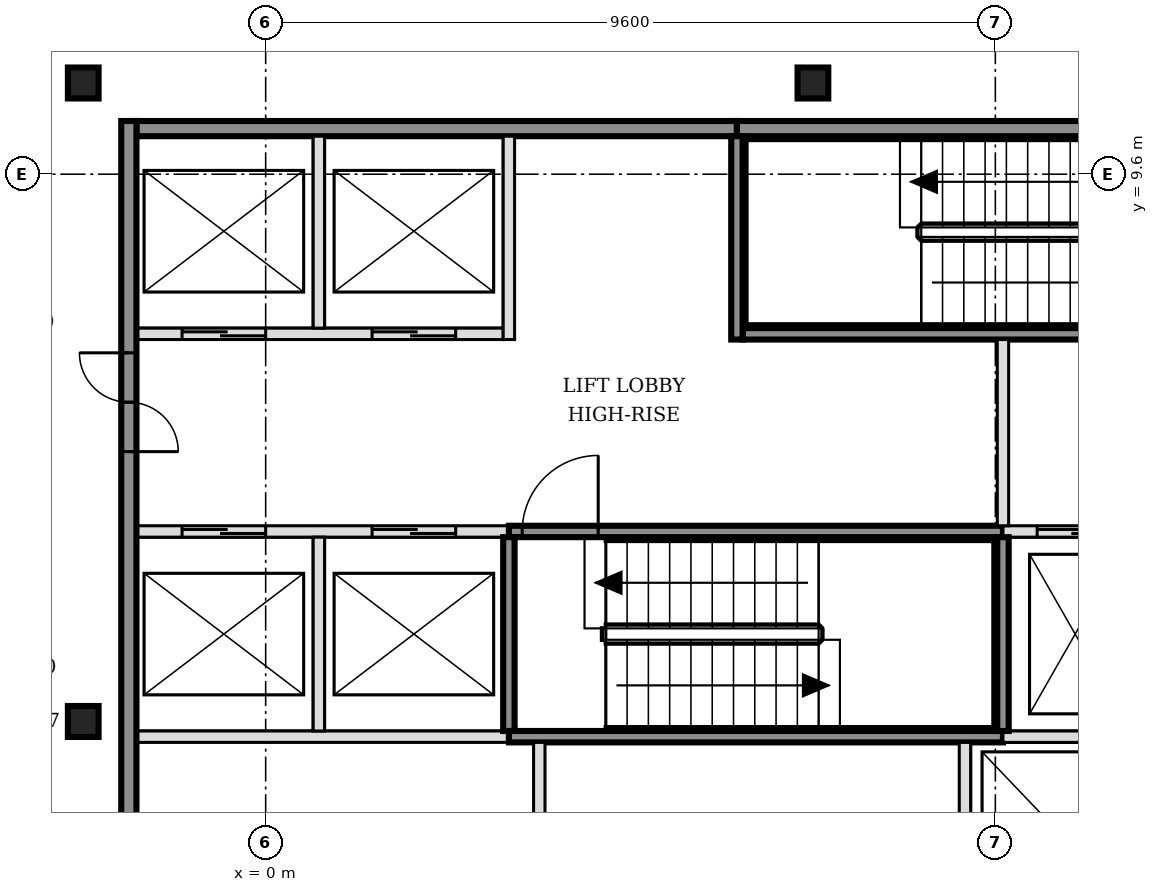
"""IFC4 building model, lengths in metres.
Left out: names, types, materials, properties, quantities, classifications, styles, units other than length and angle.
Written with IfcOpenShell. Run it as: python <this file> out.ifc"""

import sys

from ifc_helpers import new_model, si_unit, direction, frame, frame_2d, origin, origin_2d, place, context, subcontext, project, spatial, rectangle, i_section, extrude, element, fill, save


model = new_model("IFC4")
c1 = context("Model", 3, precision=1e-05, world=origin(), true_north=direction((0.0, 1.0)))
c2 = subcontext(c1, "Body", "Model", "MODEL_VIEW")
j1 = project(units=[si_unit("LENGTHUNIT", "METRE"), si_unit("PLANEANGLEUNIT", "RADIAN")], contexts=[c1])
p1 = place(None, origin())
s1 = spatial("IfcSite", under=j1, at=p1, CompositionType="ELEMENT")
p2 = place(p1, origin())
s2 = spatial("IfcBuilding", under=s1, at=p2, CompositionType="ELEMENT")
p3 = place(p2, frame((0.0, 0.0, 210.6)))
s3 = spatial("IfcBuildingStorey", under=s2, at=p3, CompositionType="ELEMENT", Elevation=210.6)
for number, where, z_axis, x_axis in (
    (1, (-2.4, 2.4, -0.15), (0.0, 0.0, 1.0), (1.0, 0.0, 0.0)),
    (2, (-2.4, 10.8, -0.15), (0.0, 0.0, 1.0), (1.0, 0.0, 0.0)),
    (3, (7.2, 10.8, -0.15), (0.0, 0.0, 1.0), (1.0, 0.0, 0.0)),
):
    element("IfcColumn", number, at=place(p3, frame(where, z_axis=z_axis, x_axis=x_axis)), inside=s3, PredefinedType="COLUMN", context=c2, shape_type="SweptSolid", body=[
        extrude(i_section(OverallWidth=0.404, OverallDepth=0.407, WebThickness=0.027, FlangeThickness=0.044, FilletRadius=0.015, at=origin_2d()), origin(), (0.0, 0.0, 1.0), 3.6),
    ])
p4 = place(p3, frame((-1.7, 2.2, 0.0), z_axis=(0.0, 0.0, 1.0), x_axis=(1.0, 0.0, 0.0)))
e4 = element("IfcWall", 4, at=p4, inside=s3, PredefinedType="SOLIDWALL", context=c2, shape_type="SweptSolid", body=[
    extrude(rectangle(XDim=4.9, YDim=0.15, at=frame_2d((2.45, 0.0))), origin(), (0.0, 0.0, 1.0), 3.45),
])
p5 = place(p3, frame((3.2, 2.2, 0.0), z_axis=(0.0, 0.0, 1.0), x_axis=(1.0, 0.0, 0.0)))
e5 = element("IfcWall", 5, at=p5, inside=s3, PredefinedType="SOLIDWALL", context=c2, shape_type="SweptSolid", body=[
    extrude(rectangle(XDim=6.5, YDim=0.15, at=frame_2d((3.25, 0.0))), origin(), (0.0, 0.0, 1.0), 3.45),
])
p6 = place(p3, frame((9.7, 2.2, 0.0), z_axis=(0.0, 0.0, 1.0), x_axis=(1.0, 0.0, 0.0)))
e6 = element("IfcWall", 6, at=p6, inside=s3, PredefinedType="SOLIDWALL", context=c2, shape_type="SweptSolid", body=[
    extrude(rectangle(XDim=4.525, YDim=0.15, at=frame_2d((2.263, 0.0))), origin(), (0.0, 0.0, 1.0), 3.45),
])
p7 = place(p3, frame((-1.7, 4.9, 0.0), z_axis=(0.0, 0.0, 1.0), x_axis=(1.0, 0.0, 0.0)))
e7 = element("IfcWall", 7, at=p7, inside=s3, PredefinedType="SOLIDWALL", context=c2, shape_type="SweptSolid", body=[
    extrude(rectangle(XDim=4.9, YDim=0.15, at=frame_2d((2.45, 0.0))), origin(), (0.0, 0.0, 1.0), 3.45),
])
p8 = place(p7, frame((0.6, 0.0, 0.0)))
e8 = element("IfcOpeningElement", 8, at=p8, cuts=e7, PredefinedType="OPENING", context=c2, shape_type="SweptSolid", body=[
    extrude(rectangle(XDim=1.1, YDim=2.1, at=frame_2d((0.55, 1.05))), frame((0.0, 0.085, 0.0), z_axis=(0.0, -1.0, 0.0), x_axis=(1.0, 0.0, 0.0)), (0.0, 0.0, 1.0), 0.17),
])
p9 = place(p7, frame((3.1, 0.0, 0.0)))
e9 = element("IfcOpeningElement", 9, at=p9, cuts=e7, PredefinedType="OPENING", context=c2, shape_type="SweptSolid", body=[
    extrude(rectangle(XDim=1.1, YDim=2.1, at=frame_2d((0.55, 1.05))), frame((0.0, 0.085, 0.0), z_axis=(0.0, -1.0, 0.0), x_axis=(1.0, 0.0, 0.0)), (0.0, 0.0, 1.0), 0.17),
])
p10 = place(p3, frame((3.2, 4.9, 0.0), z_axis=(0.0, 0.0, 1.0), x_axis=(1.0, 0.0, 0.0)))
e10 = element("IfcWall", 10, at=p10, inside=s3, PredefinedType="SOLIDWALL", context=c2, shape_type="SweptSolid", body=[
    extrude(rectangle(XDim=6.5, YDim=0.15, at=frame_2d((3.25, 0.0))), origin(), (0.0, 0.0, 1.0), 3.45),
])
p11 = place(p10, frame((0.175, 0.0, 0.0)))
e11 = element("IfcOpeningElement", 11, at=p11, cuts=e10, PredefinedType="OPENING", context=c2, shape_type="SweptSolid", body=[
    extrude(rectangle(XDim=1.0, YDim=2.1, at=frame_2d((0.5, 1.05))), frame((0.0, 0.085, 0.0), z_axis=(0.0, -1.0, 0.0), x_axis=(1.0, 0.0, 0.0)), (0.0, 0.0, 1.0), 0.17),
])
p12 = place(p3, frame((9.7, 4.9, 0.0), z_axis=(0.0, 0.0, 1.0), x_axis=(1.0, 0.0, 0.0)))
e12 = element("IfcWall", 12, at=p12, inside=s3, PredefinedType="SOLIDWALL", context=c2, shape_type="SweptSolid", body=[
    extrude(rectangle(XDim=6.4, YDim=0.15, at=frame_2d((3.2, 0.0))), origin(), (0.0, 0.0, 1.0), 3.45),
])
p13 = place(p12, frame((0.45, 0.0, 0.0)))
e13 = element("IfcOpeningElement", 13, at=p13, cuts=e12, PredefinedType="OPENING", context=c2, shape_type="SweptSolid", body=[
    extrude(rectangle(XDim=1.0, YDim=2.1, at=frame_2d((0.5, 1.05))), frame((0.0, 0.085, 0.0), z_axis=(0.0, -1.0, 0.0), x_axis=(1.0, 0.0, 0.0)), (0.0, 0.0, 1.0), 0.17),
])
p14 = place(p12, frame((2.35, 0.0, 0.0)))
e14 = element("IfcOpeningElement", 14, at=p14, cuts=e12, PredefinedType="OPENING", context=c2, shape_type="SweptSolid", body=[
    extrude(rectangle(XDim=1.0, YDim=2.1, at=frame_2d((0.5, 1.05))), frame((0.0, 0.085, 0.0), z_axis=(0.0, -1.0, 0.0), x_axis=(1.0, 0.0, 0.0)), (0.0, 0.0, 1.0), 0.17),
])
p15 = place(p12, frame((4.7, 0.0, 0.0)))
e15 = element("IfcOpeningElement", 15, at=p15, cuts=e12, PredefinedType="OPENING", context=c2, shape_type="SweptSolid", body=[
    extrude(rectangle(XDim=0.9, YDim=2.1, at=frame_2d((0.45, 1.05))), frame((0.0, 0.085, 0.0), z_axis=(0.0, -1.0, 0.0), x_axis=(1.0, 0.0, 0.0)), (0.0, 0.0, 1.0), 0.17),
])
p16 = place(p3, frame((-1.7, 7.5, 0.0), z_axis=(0.0, 0.0, 1.0), x_axis=(1.0, 0.0, 0.0)))
e16 = element("IfcWall", 16, at=p16, inside=s3, PredefinedType="SOLIDWALL", context=c2, shape_type="SweptSolid", body=[
    extrude(rectangle(XDim=4.825, YDim=0.15, at=frame_2d((2.413, 0.0))), origin(), (0.0, 0.0, 1.0), 3.45),
])
p17 = place(p16, frame((0.6, 0.0, 0.0)))
e17 = element("IfcOpeningElement", 17, at=p17, cuts=e16, PredefinedType="OPENING", context=c2, shape_type="SweptSolid", body=[
    extrude(rectangle(XDim=1.1, YDim=2.1, at=frame_2d((0.55, 1.05))), frame((0.0, 0.085, 0.0), z_axis=(0.0, -1.0, 0.0), x_axis=(1.0, 0.0, 0.0)), (0.0, 0.0, 1.0), 0.17),
])
p18 = place(p16, frame((3.1, 0.0, 0.0)))
e18 = element("IfcOpeningElement", 18, at=p18, cuts=e16, PredefinedType="OPENING", context=c2, shape_type="SweptSolid", body=[
    extrude(rectangle(XDim=1.1, YDim=2.1, at=frame_2d((0.55, 1.05))), frame((0.0, 0.085, 0.0), z_axis=(0.0, -1.0, 0.0), x_axis=(1.0, 0.0, 0.0)), (0.0, 0.0, 1.0), 0.17),
])
p19 = place(p3, frame((6.275, 7.5, 0.0), z_axis=(0.0, 0.0, 1.0), x_axis=(1.0, 0.0, 0.0)))
e19 = element("IfcWall", 19, at=p19, inside=s3, PredefinedType="SOLIDWALL", context=c2, shape_type="SweptSolid", body=[
    extrude(rectangle(XDim=6.425, YDim=0.15, at=frame_2d((3.212, 0.0))), origin(), (0.0, 0.0, 1.0), 3.45),
])
p20 = place(p19, frame((5.225, 0.0, 0.0)))
e20 = element("IfcOpeningElement", 20, at=p20, cuts=e19, PredefinedType="OPENING", context=c2, shape_type="SweptSolid", body=[
    extrude(rectangle(XDim=1.0, YDim=2.1, at=frame_2d((0.5, 1.05))), frame((0.0, 0.085, 0.0), z_axis=(0.0, -1.0, 0.0), x_axis=(1.0, 0.0, 0.0)), (0.0, 0.0, 1.0), 0.17),
])
p21 = place(p3, frame((-1.7, 10.2, 0.0), z_axis=(0.0, 0.0, 1.0), x_axis=(1.0, 0.0, 0.0)))
e21 = element("IfcWall", 21, at=p21, inside=s3, PredefinedType="SOLIDWALL", context=c2, shape_type="SweptSolid", body=[
    extrude(rectangle(XDim=7.9, YDim=0.2, at=frame_2d((3.95, 0.0))), origin(), (0.0, 0.0, 1.0), 3.45),
])
p22 = place(p3, frame((6.2, 10.2, 0.0), z_axis=(0.0, 0.0, 1.0), x_axis=(1.0, 0.0, 0.0)))
e22 = element("IfcWall", 22, at=p22, inside=s3, PredefinedType="SOLIDWALL", context=c2, shape_type="SweptSolid", body=[
    extrude(rectangle(XDim=6.5, YDim=0.2, at=frame_2d((3.25, 0.0))), origin(), (0.0, 0.0, 1.0), 3.45),
])
p23 = place(p3, frame((-1.8, -5.5, 0.0), z_axis=(0.0, 0.0, 1.0), x_axis=(0.0, 1.0, 0.0)))
e23 = element("IfcWall", 23, at=p23, inside=s3, PredefinedType="SOLIDWALL", context=c2, shape_type="SweptSolid", body=[
    extrude(rectangle(XDim=15.8, YDim=0.2, at=frame_2d((7.9, 0.0))), origin(), (0.0, 0.0, 1.0), 3.45),
])
p24 = place(p23, frame((3.05, 0.0, 0.0)))
e24 = element("IfcOpeningElement", 24, at=p24, cuts=e23, PredefinedType="OPENING", context=c2, shape_type="SweptSolid", body=[
    extrude(rectangle(XDim=1.3, YDim=2.1, at=frame_2d((0.65, 1.05))), frame((0.0, 0.11, 0.0), z_axis=(0.0, -1.0, 0.0), x_axis=(1.0, 0.0, 0.0)), (0.0, 0.0, 1.0), 0.22),
])
p25 = place(p23, frame((11.45, 0.0, 0.0)))
e25 = element("IfcOpeningElement", 25, at=p25, cuts=e23, PredefinedType="OPENING", context=c2, shape_type="SweptSolid", body=[
    extrude(rectangle(XDim=1.3, YDim=2.1, at=frame_2d((0.65, 1.05))), frame((0.0, 0.11, 0.0), z_axis=(0.0, -1.0, 0.0), x_axis=(1.0, 0.0, 0.0)), (0.0, 0.0, 1.0), 0.22),
])
p26 = place(p3, frame((0.7, 2.275, 0.0), z_axis=(0.0, 0.0, 1.0), x_axis=(0.0, 1.0, 0.0)))
e26 = element("IfcWall", 26, at=p26, inside=s3, PredefinedType="SOLIDWALL", context=c2, shape_type="SweptSolid", body=[
    extrude(rectangle(XDim=2.55, YDim=0.15, at=frame_2d((1.275, 0.0))), origin(), (0.0, 0.0, 1.0), 3.45),
])
p27 = place(p3, frame((0.7, 7.575, 0.0), z_axis=(0.0, 0.0, 1.0), x_axis=(0.0, 1.0, 0.0)))
e27 = element("IfcWall", 27, at=p27, inside=s3, PredefinedType="SOLIDWALL", context=c2, shape_type="SweptSolid", body=[
    extrude(rectangle(XDim=2.525, YDim=0.15, at=frame_2d((1.263, 0.0))), origin(), (0.0, 0.0, 1.0), 3.45),
])
p28 = place(p3, frame((3.2, 2.275, 0.0), z_axis=(0.0, 0.0, 1.0), x_axis=(0.0, 1.0, 0.0)))
e28 = element("IfcWall", 28, at=p28, inside=s3, PredefinedType="SOLIDWALL", context=c2, shape_type="SweptSolid", body=[
    extrude(rectangle(XDim=2.55, YDim=0.15, at=frame_2d((1.275, 0.0))), origin(), (0.0, 0.0, 1.0), 3.45),
])
p29 = place(p3, frame((3.2, 7.425, 0.0), z_axis=(0.0, 0.0, 1.0), x_axis=(0.0, 1.0, 0.0)))
e29 = element("IfcWall", 29, at=p29, inside=s3, PredefinedType="SOLIDWALL", context=c2, shape_type="SweptSolid", body=[
    extrude(rectangle(XDim=2.675, YDim=0.15, at=frame_2d((1.337, 0.0))), origin(), (0.0, 0.0, 1.0), 3.45),
])
p30 = place(p3, frame((3.6, -0.325, 0.0), z_axis=(0.0, 0.0, 1.0), x_axis=(0.0, 1.0, 0.0)))
e30 = element("IfcWall", 30, at=p30, inside=s3, PredefinedType="PARTITIONING", context=c2, shape_type="SweptSolid", body=[
    extrude(rectangle(XDim=2.45, YDim=0.15, at=frame_2d((1.225, 0.0))), origin(), (0.0, 0.0, 1.0), 3.45),
])
p31 = place(p3, frame((6.2, 7.425, 0.0), z_axis=(0.0, 0.0, 1.0), x_axis=(0.0, 1.0, 0.0)))
e31 = element("IfcWall", 31, at=p31, inside=s3, PredefinedType="SOLIDWALL", context=c2, shape_type="SweptSolid", body=[
    extrude(rectangle(XDim=2.675, YDim=0.15, at=frame_2d((1.337, 0.0))), origin(), (0.0, 0.0, 1.0), 3.45),
])
p32 = place(p3, frame((9.2, -0.475, 0.0), z_axis=(0.0, 0.0, 1.0), x_axis=(0.0, 1.0, 0.0)))
e32 = element("IfcWall", 32, at=p32, inside=s3, PredefinedType="SOLIDWALL", context=c2, shape_type="SweptSolid", body=[
    extrude(rectangle(XDim=2.6, YDim=0.15, at=frame_2d((1.3, 0.0))), origin(), (0.0, 0.0, 1.0), 3.45),
])
p33 = place(p3, frame((9.7, 2.275, 0.0), z_axis=(0.0, 0.0, 1.0), x_axis=(0.0, 1.0, 0.0)))
e33 = element("IfcWall", 33, at=p33, inside=s3, PredefinedType="SOLIDWALL", context=c2, shape_type="SweptSolid", body=[
    extrude(rectangle(XDim=2.55, YDim=0.15, at=frame_2d((1.275, 0.0))), origin(), (0.0, 0.0, 1.0), 3.45),
])
p34 = place(p3, frame((9.7, 4.975, 0.0), z_axis=(0.0, 0.0, 1.0), x_axis=(0.0, 1.0, 0.0)))
e34 = element("IfcWall", 34, at=p34, inside=s3, PredefinedType="SOLIDWALL", context=c2, shape_type="SweptSolid", body=[
    extrude(rectangle(XDim=2.45, YDim=0.15, at=frame_2d((1.225, 0.0))), origin(), (0.0, 0.0, 1.0), 3.45),
])
p35 = place(p8, origin())
e35 = element("IfcDoor", 35, at=p35, inside=s3, OperationType="DOUBLE_DOOR_SLIDING", PredefinedType="DOOR", context=c2, shape_type="SweptSolid", body=[
    extrude(rectangle(XDim=1.1, YDim=2.1, at=frame_2d((0.55, 1.05))), frame((0.0, 0.025, 0.0), z_axis=(0.0, -1.0, 0.0), x_axis=(1.0, 0.0, 0.0)), (0.0, 0.0, 1.0), 0.05),
])
fill(e8, e35)
p36 = place(p9, origin())
e36 = element("IfcDoor", 36, at=p36, inside=s3, OperationType="DOUBLE_DOOR_SLIDING", PredefinedType="DOOR", context=c2, shape_type="SweptSolid", body=[
    extrude(rectangle(XDim=1.1, YDim=2.1, at=frame_2d((0.55, 1.05))), frame((0.0, 0.025, 0.0), z_axis=(0.0, -1.0, 0.0), x_axis=(1.0, 0.0, 0.0)), (0.0, 0.0, 1.0), 0.05),
])
fill(e9, e36)
p37 = place(p17, origin())
e37 = element("IfcDoor", 37, at=p37, inside=s3, OperationType="DOUBLE_DOOR_SLIDING", PredefinedType="DOOR", context=c2, shape_type="SweptSolid", body=[
    extrude(rectangle(XDim=1.1, YDim=2.1, at=frame_2d((0.55, 1.05))), frame((0.0, 0.025, 0.0), z_axis=(0.0, -1.0, 0.0), x_axis=(1.0, 0.0, 0.0)), (0.0, 0.0, 1.0), 0.05),
])
fill(e17, e37)
p38 = place(p18, origin())
e38 = element("IfcDoor", 38, at=p38, inside=s3, OperationType="DOUBLE_DOOR_SLIDING", PredefinedType="DOOR", context=c2, shape_type="SweptSolid", body=[
    extrude(rectangle(XDim=1.1, YDim=2.1, at=frame_2d((0.55, 1.05))), frame((0.0, 0.025, 0.0), z_axis=(0.0, -1.0, 0.0), x_axis=(1.0, 0.0, 0.0)), (0.0, 0.0, 1.0), 0.05),
])
fill(e18, e38)
p39 = place(p13, origin())
e39 = element("IfcDoor", 39, at=p39, inside=s3, OperationType="DOUBLE_DOOR_SLIDING", PredefinedType="DOOR", context=c2, shape_type="SweptSolid", body=[
    extrude(rectangle(XDim=1.0, YDim=2.1, at=frame_2d((0.5, 1.05))), frame((0.0, 0.025, 0.0), z_axis=(0.0, -1.0, 0.0), x_axis=(1.0, 0.0, 0.0)), (0.0, 0.0, 1.0), 0.05),
])
fill(e13, e39)
p40 = place(p11, origin())
e40 = element("IfcDoor", 40, at=p40, inside=s3, OperationType="SINGLE_SWING_RIGHT", PredefinedType="DOOR", context=c2, shape_type="SweptSolid", body=[
    extrude(rectangle(XDim=1.0, YDim=2.1, at=frame_2d((0.5, 1.05))), frame((0.0, 0.025, 0.0), z_axis=(0.0, -1.0, 0.0), x_axis=(1.0, 0.0, 0.0)), (0.0, 0.0, 1.0), 0.05),
])
fill(e11, e40)
p41 = place(p25, origin())
e41 = element("IfcDoor", 41, at=p41, inside=s3, OperationType="DOUBLE_DOOR_SINGLE_SWING", PredefinedType="DOOR", context=c2, shape_type="SweptSolid", body=[
    extrude(rectangle(XDim=1.3, YDim=2.1, at=frame_2d((0.65, 1.05))), frame((0.0, 0.025, 0.0), z_axis=(0.0, -1.0, 0.0), x_axis=(1.0, 0.0, 0.0)), (0.0, 0.0, 1.0), 0.05),
])
fill(e25, e41)
save(model, sys.argv[1])
